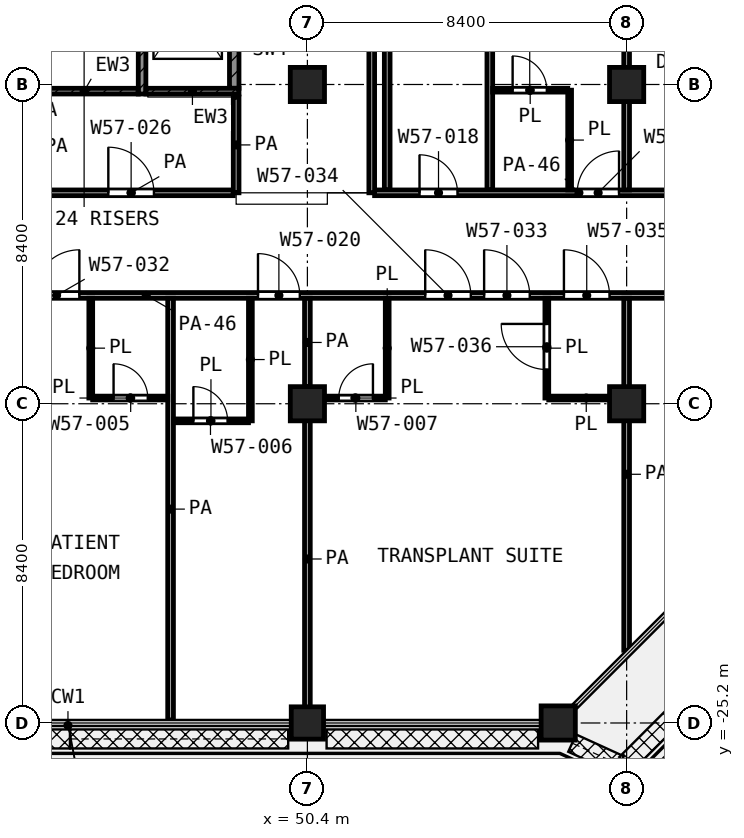
"""IFC4 building model, lengths in metres.
Left out: names, types, materials, properties, quantities, classifications, styles, units other than length and angle.
Written with IfcOpenShell. Run it as: python <this file> out.ifc"""

import sys

from ifc_helpers import new_model, si_unit, direction, frame, frame_2d, origin, origin_2d, place, context, subcontext, project, spatial, rectangle, extrude, element, fill, save


model = new_model("IFC4")
c1 = context("Model", 3, precision=1e-05, world=origin(), true_north=direction((0.0, 1.0)))
c2 = subcontext(c1, "Body", "Model", "MODEL_VIEW")
j1 = project(units=[si_unit("LENGTHUNIT", "METRE"), si_unit("PLANEANGLEUNIT", "RADIAN")], contexts=[c1])
p1 = place(None, origin())
s1 = spatial("IfcSite", under=j1, at=p1, CompositionType="ELEMENT")
p2 = place(p1, origin())
s2 = spatial("IfcBuilding", under=s1, at=p2, CompositionType="ELEMENT")
p3 = place(p2, frame((0.0, 0.0, 247.4)))
s3 = spatial("IfcBuildingStorey", under=s2, at=p3, CompositionType="ELEMENT", Elevation=247.4)
for number, where, z_axis, x_axis in (
    (1, (50.4, -8.4, 0.0), (0.0, 0.0, 1.0), (1.0, 0.0, 0.0)),
    (2, (58.8, -8.4, 0.0), (0.0, 0.0, 1.0), (1.0, 0.0, 0.0)),
    (3, (50.4, -16.8, 0.0), (0.0, 0.0, 1.0), (1.0, 0.0, 0.0)),
    (4, (58.8, -16.8, 0.0), (0.0, 0.0, 1.0), (1.0, 0.0, 0.0)),
):
    element("IfcColumn", number, at=place(p3, frame(where, z_axis=z_axis, x_axis=x_axis)), inside=s3, PredefinedType="COLUMN", context=c2, shape_type="SweptSolid", body=[
        extrude(rectangle(XDim=0.9, YDim=0.9, at=origin_2d()), origin(), (0.0, 0.0, 1.0), 4.2),
    ])
p4 = place(p3, frame((50.4, -25.2, 0.0), z_axis=(0.0, 0.0, 1.0), x_axis=(1.0, 0.0, 0.0)))
e5 = element("IfcColumn", 5, at=p4, inside=s3, PredefinedType="COLUMN", context=c2, shape_type="SweptSolid", body=[
    extrude(rectangle(XDim=0.85, YDim=0.85, at=origin_2d()), origin(), (0.0, 0.0, 1.0), 4.2),
])
p5 = place(p3, frame((57.0, -25.2, 0.0), z_axis=(0.0, 0.0, 1.0), x_axis=(1.0, 0.0, 0.0)))
e6 = element("IfcColumn", 6, at=p5, inside=s3, PredefinedType="COLUMN", context=c2, shape_type="SweptSolid", body=[
    extrude(rectangle(XDim=0.9, YDim=0.9, at=origin_2d()), origin(), (0.0, 0.0, 1.0), 4.2),
])
p6 = place(p3, frame((46.05, -8.65, 0.0), z_axis=(0.0, 0.0, 1.0), x_axis=(0.0, 1.0, 0.0)))
e7 = element("IfcWall", 7, at=p6, inside=s3, PredefinedType="SHEAR", context=c2, shape_type="SweptSolid", body=[
    extrude(rectangle(XDim=8.35, YDim=0.2, at=frame_2d((4.175, 0.0))), origin(), (0.0, 0.0, 1.0), 3.6),
])
p7 = place(p6, frame((7.0, 0.0, 0.0)))
e8 = element("IfcOpeningElement", 8, at=p7, cuts=e7, PredefinedType="OPENING", context=c2, shape_type="SweptSolid", body=[
    extrude(rectangle(XDim=1.1, YDim=2.1, at=frame_2d((0.55, 1.05))), frame((0.0, 0.11, 0.0), z_axis=(0.0, -1.0, 0.0), x_axis=(1.0, 0.0, 0.0)), (0.0, 0.0, 1.0), 0.22),
])
p8 = place(p3, frame((43.1, -8.575, 0.0), z_axis=(0.0, 0.0, 1.0), x_axis=(1.0, 0.0, 0.0)))
e9 = element("IfcWall", 9, at=p8, inside=s3, PredefinedType="SHEAR", context=c2, shape_type="SweptSolid", body=[
    extrude(rectangle(XDim=2.85, YDim=0.15, at=frame_2d((1.425, 0.0))), origin(), (0.0, 0.0, 1.0), 3.6),
])
p9 = place(p3, frame((46.15, -8.575, 0.0), z_axis=(0.0, 0.0, 1.0), x_axis=(1.0, 0.0, 0.0)))
e10 = element("IfcWall", 10, at=p9, inside=s3, PredefinedType="SHEAR", context=c2, shape_type="SweptSolid", body=[
    extrude(rectangle(XDim=2.45, YDim=0.15, at=frame_2d((1.225, 0.0))), origin(), (0.0, 0.0, 1.0), 3.6),
])
p10 = place(p3, frame((48.475, -8.5, 0.0), z_axis=(0.0, 0.0, 1.0), x_axis=(0.0, 1.0, 0.0)))
e11 = element("IfcWall", 11, at=p10, inside=s3, PredefinedType="SHEAR", context=c2, shape_type="SweptSolid", body=[
    extrude(rectangle(XDim=3.475, YDim=0.25, at=frame_2d((1.738, 0.0))), origin(), (0.0, 0.0, 1.0), 3.6),
])
p11 = place(p3, frame((46.875, -17.25, 0.0), z_axis=(0.0, 0.0, 1.0), x_axis=(1.0, 0.0, 0.0)))
e12 = element("IfcWall", 12, at=p11, inside=s3, PredefinedType="PARTITIONING", context=c2, shape_type="SweptSolid", body=[
    extrude(rectangle(XDim=1.975, YDim=0.1, at=frame_2d((0.988, 0.0))), origin(), (0.0, 0.0, 1.0), 3.6),
])
p12 = place(p11, frame((0.525, 0.0, 0.0)))
e13 = element("IfcOpeningElement", 13, at=p12, cuts=e12, PredefinedType="OPENING", context=c2, shape_type="SweptSolid", body=[
    extrude(rectangle(XDim=0.9, YDim=2.1, at=frame_2d((0.45, 1.05))), frame((0.0, 0.06, 0.0), z_axis=(0.0, -1.0, 0.0), x_axis=(1.0, 0.0, 0.0)), (0.0, 0.0, 1.0), 0.12),
])
p13 = place(p3, frame((44.75, -16.65, 0.0), z_axis=(0.0, 0.0, 1.0), x_axis=(1.0, 0.0, 0.0)))
e14 = element("IfcWall", 14, at=p13, inside=s3, PredefinedType="PARTITIONING", context=c2, shape_type="SweptSolid", body=[
    extrude(rectangle(XDim=1.975, YDim=0.1, at=frame_2d((0.988, 0.0))), origin(), (0.0, 0.0, 1.0), 3.6),
])
p14 = place(p13, frame((0.55, 0.0, 0.0)))
e15 = element("IfcOpeningElement", 15, at=p14, cuts=e14, PredefinedType="OPENING", context=c2, shape_type="SweptSolid", body=[
    extrude(rectangle(XDim=0.9, YDim=2.1, at=frame_2d((0.45, 1.05))), frame((0.0, 0.06, 0.0), z_axis=(0.0, -1.0, 0.0), x_axis=(1.0, 0.0, 0.0)), (0.0, 0.0, 1.0), 0.12),
])
p15 = place(p3, frame((50.85, -16.65, 0.0), z_axis=(0.0, 0.0, 1.0), x_axis=(1.0, 0.0, 0.0)))
e16 = element("IfcWall", 16, at=p15, inside=s3, PredefinedType="PARTITIONING", context=c2, shape_type="SweptSolid", body=[
    extrude(rectangle(XDim=1.6, YDim=0.1, at=frame_2d((0.8, 0.0))), origin(), (0.0, 0.0, 1.0), 3.6),
])
p16 = place(p15, frame((0.375, 0.0, 0.0)))
e17 = element("IfcOpeningElement", 17, at=p16, cuts=e16, PredefinedType="OPENING", context=c2, shape_type="SweptSolid", body=[
    extrude(rectangle(XDim=0.9, YDim=2.1, at=frame_2d((0.45, 1.05))), frame((0.0, 0.06, 0.0), z_axis=(0.0, -1.0, 0.0), x_axis=(1.0, 0.0, 0.0)), (0.0, 0.0, 1.0), 0.12),
])
p17 = place(p3, frame((56.75, -16.65, 0.0), z_axis=(0.0, 0.0, 1.0), x_axis=(1.0, 0.0, 0.0)))
e18 = element("IfcWall", 18, at=p17, inside=s3, PredefinedType="PARTITIONING", context=c2, shape_type="SweptSolid", body=[
    extrude(rectangle(XDim=1.975, YDim=0.1, at=frame_2d((0.988, 0.0))), origin(), (0.0, 0.0, 1.0), 3.6),
])
p18 = place(p3, frame((55.275, -8.55, 0.0), z_axis=(0.0, 0.0, 1.0), x_axis=(1.0, 0.0, 0.0)))
e19 = element("IfcWall", 19, at=p18, inside=s3, PredefinedType="PARTITIONING", context=c2, shape_type="SweptSolid", body=[
    extrude(rectangle(XDim=1.975, YDim=0.1, at=frame_2d((0.988, 0.0))), origin(), (0.0, 0.0, 1.0), 3.6),
])
p19 = place(p18, frame((0.525, 0.0, 0.0)))
e20 = element("IfcOpeningElement", 20, at=p19, cuts=e19, PredefinedType="OPENING", context=c2, shape_type="SweptSolid", body=[
    extrude(rectangle(XDim=0.9, YDim=2.1, at=frame_2d((0.45, 1.05))), frame((0.0, 0.06, 0.0), z_axis=(0.0, -1.0, 0.0), x_axis=(1.0, 0.0, 0.0)), (0.0, 0.0, 1.0), 0.12),
])
p20 = place(p3, frame((44.7, -16.65, 0.0), z_axis=(0.0, 0.0, 1.0), x_axis=(0.0, 1.0, 0.0)))
e21 = element("IfcWall", 21, at=p20, inside=s3, PredefinedType="PARTITIONING", context=c2, shape_type="SweptSolid", body=[
    extrude(rectangle(XDim=2.625, YDim=0.1, at=frame_2d((1.312, 0.0))), origin(), (0.0, 0.0, 1.0), 3.6),
])
p21 = place(p3, frame((48.9, -17.25, 0.0), z_axis=(0.0, 0.0, 1.0), x_axis=(0.0, 1.0, 0.0)))
e22 = element("IfcWall", 22, at=p21, inside=s3, PredefinedType="PARTITIONING", context=c2, shape_type="SweptSolid", body=[
    extrude(rectangle(XDim=3.225, YDim=0.1, at=frame_2d((1.613, 0.0))), origin(), (0.0, 0.0, 1.0), 3.6),
])
p22 = place(p3, frame((52.5, -16.65, 0.0), z_axis=(0.0, 0.0, 1.0), x_axis=(0.0, 1.0, 0.0)))
e23 = element("IfcWall", 23, at=p22, inside=s3, PredefinedType="PARTITIONING", context=c2, shape_type="SweptSolid", body=[
    extrude(rectangle(XDim=2.625, YDim=0.1, at=frame_2d((1.312, 0.0))), origin(), (0.0, 0.0, 1.0), 3.6),
])
p23 = place(p3, frame((56.7, -16.65, 0.0), z_axis=(0.0, 0.0, 1.0), x_axis=(0.0, 1.0, 0.0)))
e24 = element("IfcWall", 24, at=p23, inside=s3, PredefinedType="PARTITIONING", context=c2, shape_type="SweptSolid", body=[
    extrude(rectangle(XDim=2.625, YDim=0.1, at=frame_2d((1.312, 0.0))), origin(), (0.0, 0.0, 1.0), 3.6),
])
p24 = place(p23, frame((0.75, 0.0, 0.0)))
e25 = element("IfcOpeningElement", 25, at=p24, cuts=e24, PredefinedType="OPENING", context=c2, shape_type="SweptSolid", body=[
    extrude(rectangle(XDim=1.2, YDim=2.1, at=frame_2d((0.6, 1.05))), frame((0.0, 0.06, 0.0), z_axis=(0.0, -1.0, 0.0), x_axis=(1.0, 0.0, 0.0)), (0.0, 0.0, 1.0), 0.12),
])
p25 = place(p3, frame((57.3, -11.175, 0.0), z_axis=(0.0, 0.0, 1.0), x_axis=(0.0, 1.0, 0.0)))
e26 = element("IfcWall", 26, at=p25, inside=s3, PredefinedType="PARTITIONING", context=c2, shape_type="SweptSolid", body=[
    extrude(rectangle(XDim=2.625, YDim=0.1, at=frame_2d((1.312, 0.0))), origin(), (0.0, 0.0, 1.0), 3.6),
])
p26 = place(p3, frame((29.4, -13.95, 0.0), z_axis=(0.0, 0.0, 1.0), x_axis=(1.0, 0.0, 0.0)))
e27 = element("IfcWall", 27, at=p26, inside=s3, PredefinedType="PARTITIONING", context=c2, shape_type="SweptSolid", body=[
    extrude(rectangle(XDim=33.52, YDim=0.15, at=frame_2d((16.76, 0.0))), origin(), (0.0, 0.0, 1.0), 2.7),
])
p27 = place(p26, frame((1.5, 0.0, 0.0)))
e28 = element("IfcOpeningElement", 28, at=p27, cuts=e27, PredefinedType="OPENING", context=c2, shape_type="SweptSolid", body=[
    extrude(rectangle(XDim=1.2, YDim=2.1, at=frame_2d((0.6, 1.05))), frame((0.0, 0.085, 0.0), z_axis=(0.0, -1.0, 0.0), x_axis=(1.0, 0.0, 0.0)), (0.0, 0.0, 1.0), 0.17),
])
p28 = place(p26, frame((8.85, 0.0, 0.0)))
e29 = element("IfcOpeningElement", 29, at=p28, cuts=e27, PredefinedType="OPENING", context=c2, shape_type="SweptSolid", body=[
    extrude(rectangle(XDim=1.2, YDim=2.1, at=frame_2d((0.6, 1.05))), frame((0.0, 0.085, 0.0), z_axis=(0.0, -1.0, 0.0), x_axis=(1.0, 0.0, 0.0)), (0.0, 0.0, 1.0), 0.17),
])
p29 = place(p26, frame((7.3, 0.0, 0.0)))
e30 = element("IfcOpeningElement", 30, at=p29, cuts=e27, PredefinedType="OPENING", context=c2, shape_type="SweptSolid", body=[
    extrude(rectangle(XDim=1.2, YDim=2.1, at=frame_2d((0.6, 1.05))), frame((0.0, 0.085, 0.0), z_axis=(0.0, -1.0, 0.0), x_axis=(1.0, 0.0, 0.0)), (0.0, 0.0, 1.0), 0.17),
])
p30 = place(p26, frame((10.95, 0.0, 0.0)))
e31 = element("IfcOpeningElement", 31, at=p30, cuts=e27, PredefinedType="OPENING", context=c2, shape_type="SweptSolid", body=[
    extrude(rectangle(XDim=1.2, YDim=2.1, at=frame_2d((0.6, 1.05))), frame((0.0, 0.085, 0.0), z_axis=(0.0, -1.0, 0.0), x_axis=(1.0, 0.0, 0.0)), (0.0, 0.0, 1.0), 0.17),
])
p31 = place(p26, frame((13.8, 0.0, 0.0)))
e32 = element("IfcOpeningElement", 32, at=p31, cuts=e27, PredefinedType="OPENING", context=c2, shape_type="SweptSolid", body=[
    extrude(rectangle(XDim=1.2, YDim=2.1, at=frame_2d((0.6, 1.05))), frame((0.0, 0.085, 0.0), z_axis=(0.0, -1.0, 0.0), x_axis=(1.0, 0.0, 0.0)), (0.0, 0.0, 1.0), 0.17),
])
p32 = place(p26, frame((19.7, 0.0, 0.0)))
e33 = element("IfcOpeningElement", 33, at=p32, cuts=e27, PredefinedType="OPENING", context=c2, shape_type="SweptSolid", body=[
    extrude(rectangle(XDim=1.1, YDim=2.1, at=frame_2d((0.55, 1.05))), frame((0.0, 0.085, 0.0), z_axis=(0.0, -1.0, 0.0), x_axis=(1.0, 0.0, 0.0)), (0.0, 0.0, 1.0), 0.17),
])
p33 = place(p26, frame((25.65, 0.0, 0.0)))
e34 = element("IfcOpeningElement", 34, at=p33, cuts=e27, PredefinedType="OPENING", context=c2, shape_type="SweptSolid", body=[
    extrude(rectangle(XDim=1.2, YDim=2.1, at=frame_2d((0.6, 1.05))), frame((0.0, 0.085, 0.0), z_axis=(0.0, -1.0, 0.0), x_axis=(1.0, 0.0, 0.0)), (0.0, 0.0, 1.0), 0.17),
])
p34 = place(p26, frame((24.1, 0.0, 0.0)))
e35 = element("IfcOpeningElement", 35, at=p34, cuts=e27, PredefinedType="OPENING", context=c2, shape_type="SweptSolid", body=[
    extrude(rectangle(XDim=1.2, YDim=2.1, at=frame_2d((0.6, 1.05))), frame((0.0, 0.085, 0.0), z_axis=(0.0, -1.0, 0.0), x_axis=(1.0, 0.0, 0.0)), (0.0, 0.0, 1.0), 0.17),
])
p35 = place(p26, frame((27.75, 0.0, 0.0)))
e36 = element("IfcOpeningElement", 36, at=p35, cuts=e27, PredefinedType="OPENING", context=c2, shape_type="SweptSolid", body=[
    extrude(rectangle(XDim=1.2, YDim=2.1, at=frame_2d((0.6, 1.05))), frame((0.0, 0.085, 0.0), z_axis=(0.0, -1.0, 0.0), x_axis=(1.0, 0.0, 0.0)), (0.0, 0.0, 1.0), 0.17),
])
p36 = place(p26, frame((31.0, 0.0, 0.0)))
e37 = element("IfcOpeningElement", 37, at=p36, cuts=e27, PredefinedType="OPENING", context=c2, shape_type="SweptSolid", body=[
    extrude(rectangle(XDim=1.0, YDim=2.1, at=frame_2d((0.5, 1.05))), frame((0.0, 0.085, 0.0), z_axis=(0.0, -1.0, 0.0), x_axis=(1.0, 0.0, 0.0)), (0.0, 0.0, 1.0), 0.17),
])
p37 = place(p3, frame((43.075, -11.25, 0.0), z_axis=(0.0, 0.0, 1.0), x_axis=(1.0, 0.0, 0.0)))
e38 = element("IfcWall", 38, at=p37, inside=s3, PredefinedType="PARTITIONING", context=c2, shape_type="SweptSolid", body=[
    extrude(rectangle(XDim=5.375, YDim=0.15, at=frame_2d((2.688, 0.0))), origin(), (0.0, 0.0, 1.0), 3.6),
])
p38 = place(p37, frame((2.087, 0.0, 0.0)))
e39 = element("IfcOpeningElement", 39, at=p38, cuts=e38, PredefinedType="OPENING", context=c2, shape_type="SweptSolid", body=[
    extrude(rectangle(XDim=1.2, YDim=2.1, at=frame_2d((0.6, 1.05))), frame((0.0, 0.085, 0.0), z_axis=(0.0, -1.0, 0.0), x_axis=(1.0, 0.0, 0.0)), (0.0, 0.0, 1.0), 0.17),
])
p39 = place(p3, frame((52.168, -11.25, 0.0), z_axis=(0.0, 0.0, 1.0), x_axis=(1.0, 0.0, 0.0)))
e40 = element("IfcWall", 40, at=p39, inside=s3, PredefinedType="PARTITIONING", context=c2, shape_type="SweptSolid", body=[
    extrude(rectangle(XDim=10.752, YDim=0.15, at=frame_2d((5.376, 0.0))), origin(), (0.0, 0.0, 1.0), 2.7),
])
p40 = place(p39, frame((5.332, 0.0, 0.0)))
e41 = element("IfcOpeningElement", 41, at=p40, cuts=e40, PredefinedType="OPENING", context=c2, shape_type="SweptSolid", body=[
    extrude(rectangle(XDim=1.1, YDim=2.1, at=frame_2d((0.55, 1.05))), frame((0.0, 0.085, 0.0), z_axis=(0.0, -1.0, 0.0), x_axis=(1.0, 0.0, 0.0)), (0.0, 0.0, 1.0), 0.17),
])
p41 = place(p39, frame((8.232, 0.0, 0.0)))
e42 = element("IfcOpeningElement", 42, at=p41, cuts=e40, PredefinedType="OPENING", context=c2, shape_type="SweptSolid", body=[
    extrude(rectangle(XDim=1.0, YDim=2.1, at=frame_2d((0.5, 1.05))), frame((0.0, 0.085, 0.0), z_axis=(0.0, -1.0, 0.0), x_axis=(1.0, 0.0, 0.0)), (0.0, 0.0, 1.0), 0.17),
])
p42 = place(p39, frame((1.182, 0.0, 0.0)))
e43 = element("IfcOpeningElement", 43, at=p42, cuts=e40, PredefinedType="OPENING", context=c2, shape_type="SweptSolid", body=[
    extrude(rectangle(XDim=1.0, YDim=2.1, at=frame_2d((0.5, 1.05))), frame((0.0, 0.085, 0.0), z_axis=(0.0, -1.0, 0.0), x_axis=(1.0, 0.0, 0.0)), (0.0, 0.0, 1.0), 0.17),
])
p43 = place(p3, frame((46.8, -25.12, 0.0), z_axis=(0.0, 0.0, 1.0), x_axis=(0.0, 1.0, 0.0)))
e44 = element("IfcWall", 44, at=p43, inside=s3, PredefinedType="PARTITIONING", context=c2, shape_type="SweptSolid", body=[
    extrude(rectangle(XDim=11.095, YDim=0.15, at=frame_2d((5.548, 0.0))), origin(), (0.0, 0.0, 1.0), 3.6),
])
p44 = place(p3, frame((48.525, -11.25, 0.0), z_axis=(0.0, 0.0, 1.0), x_axis=(0.0, 1.0, 0.0)))
e45 = element("IfcWall", 45, at=p44, inside=s3, PredefinedType="PARTITIONING", context=c2, shape_type="SweptSolid", body=[
    extrude(rectangle(XDim=2.52, YDim=0.15, at=frame_2d((1.26, 0.0))), origin(), (0.0, 0.0, 1.0), 3.6),
])
p45 = place(p3, frame((50.4, -25.12, 0.0), z_axis=(0.0, 0.0, 1.0), x_axis=(0.0, 1.0, 0.0)))
e46 = element("IfcWall", 46, at=p45, inside=s3, PredefinedType="PARTITIONING", context=c2, shape_type="SweptSolid", body=[
    extrude(rectangle(XDim=8.47, YDim=0.15, at=frame_2d((4.235, 0.0))), origin(), (0.0, 0.0, 1.0), 3.6),
])
p46 = place(p3, frame((50.4, -16.35, 0.0), z_axis=(0.0, 0.0, 1.0), x_axis=(0.0, 1.0, 0.0)))
e47 = element("IfcWall", 47, at=p46, inside=s3, PredefinedType="PARTITIONING", context=c2, shape_type="SweptSolid", body=[
    extrude(rectangle(XDim=2.325, YDim=0.15, at=frame_2d((1.163, 0.0))), origin(), (0.0, 0.0, 1.0), 3.6),
])
p47 = place(p3, frame((52.093, -11.25, 0.0), z_axis=(0.0, 0.0, 1.0), x_axis=(0.0, 1.0, 0.0)))
e48 = element("IfcWall", 48, at=p47, inside=s3, PredefinedType="PARTITIONING", context=c2, shape_type="SweptSolid", body=[
    extrude(rectangle(XDim=9.399, YDim=0.15, at=frame_2d((4.699, 0.0))), origin(), (0.0, 0.0, 1.0), 3.6),
])
for number, where, z_axis, x_axis in (
    (49, (52.5, -11.175, 0.0), (0.0, 0.0, 1.0), (0.0, 1.0, 0.0)),
    (50, (55.2, -11.175, 0.0), (0.0, 0.0, 1.0), (0.0, 1.0, 0.0)),
):
    element("IfcWall", number, at=place(p3, frame(where, z_axis=z_axis, x_axis=x_axis)), inside=s3, PredefinedType="PARTITIONING", context=c2, shape_type="SweptSolid", body=[
        extrude(rectangle(XDim=11.095, YDim=0.15, at=frame_2d((5.547, 0.0))), origin(), (0.0, 0.0, 1.0), 3.6),
    ])
p48 = place(p3, frame((58.8, -23.287, 0.0), z_axis=(0.0, 0.0, 1.0), x_axis=(0.0, 1.0, 0.0)))
e51 = element("IfcWall", 51, at=p48, inside=s3, PredefinedType="PARTITIONING", context=c2, shape_type="SweptSolid", body=[
    extrude(rectangle(XDim=9.262, YDim=0.15, at=frame_2d((4.631, 0.0))), origin(), (0.0, 0.0, 1.0), 2.7),
])
p49 = place(p3, frame((58.8, -11.175, 0.0), z_axis=(0.0, 0.0, 1.0), x_axis=(0.0, 1.0, 0.0)))
e52 = element("IfcWall", 52, at=p49, inside=s3, PredefinedType="PARTITIONING", context=c2, shape_type="SweptSolid", body=[
    extrude(rectangle(XDim=9.262, YDim=0.15, at=frame_2d((4.631, 0.0))), origin(), (0.0, 0.0, 1.0), 2.7),
])
p50 = place(p38, origin())
e53 = element("IfcDoor", 53, at=p50, inside=s3, OperationType="SINGLE_SWING_LEFT", PredefinedType="DOOR", context=c2, shape_type="SweptSolid", body=[
    extrude(rectangle(XDim=1.2, YDim=2.1, at=frame_2d((0.6, 1.05))), frame((0.0, 0.025, 0.0), z_axis=(0.0, -1.0, 0.0), x_axis=(1.0, 0.0, 0.0)), (0.0, 0.0, 1.0), 0.05),
])
fill(e39, e53)
p51 = place(p40, origin())
e54 = element("IfcDoor", 54, at=p51, inside=s3, OperationType="SINGLE_SWING_RIGHT", PredefinedType="DOOR", context=c2, shape_type="SweptSolid", body=[
    extrude(rectangle(XDim=1.1, YDim=2.1, at=frame_2d((0.55, 1.05))), frame((0.0, 0.025, 0.0), z_axis=(0.0, -1.0, 0.0), x_axis=(1.0, 0.0, 0.0)), (0.0, 0.0, 1.0), 0.05),
])
fill(e41, e54)
p52 = place(p19, origin())
e55 = element("IfcDoor", 55, at=p52, inside=s3, OperationType="SINGLE_SWING_LEFT", PredefinedType="DOOR", context=c2, shape_type="SweptSolid", body=[
    extrude(rectangle(XDim=0.9, YDim=2.1, at=frame_2d((0.45, 1.05))), frame((0.0, 0.025, 0.0), z_axis=(0.0, -1.0, 0.0), x_axis=(1.0, 0.0, 0.0)), (0.0, 0.0, 1.0), 0.05),
])
fill(e20, e55)
p53 = place(p31, origin())
e56 = element("IfcDoor", 56, at=p53, inside=s3, OperationType="SINGLE_SWING_RIGHT", PredefinedType="DOOR", context=c2, shape_type="SweptSolid", body=[
    extrude(rectangle(XDim=1.2, YDim=2.1, at=frame_2d((0.6, 1.05))), frame((0.0, 0.025, 0.0), z_axis=(0.0, -1.0, 0.0), x_axis=(1.0, 0.0, 0.0)), (0.0, 0.0, 1.0), 0.05),
])
fill(e32, e56)
p54 = place(p14, origin())
e57 = element("IfcDoor", 57, at=p54, inside=s3, OperationType="SINGLE_SWING_LEFT", PredefinedType="DOOR", context=c2, shape_type="SweptSolid", body=[
    extrude(rectangle(XDim=0.9, YDim=2.1, at=frame_2d((0.45, 1.05))), frame((0.0, 0.025, 0.0), z_axis=(0.0, -1.0, 0.0), x_axis=(1.0, 0.0, 0.0)), (0.0, 0.0, 1.0), 0.05),
])
fill(e15, e57)
p55 = place(p32, origin())
e58 = element("IfcDoor", 58, at=p55, inside=s3, OperationType="SINGLE_SWING_LEFT", PredefinedType="DOOR", context=c2, shape_type="SweptSolid", body=[
    extrude(rectangle(XDim=1.1, YDim=2.1, at=frame_2d((0.55, 1.05))), frame((0.0, 0.025, 0.0), z_axis=(0.0, -1.0, 0.0), x_axis=(1.0, 0.0, 0.0)), (0.0, 0.0, 1.0), 0.05),
])
fill(e33, e58)
p56 = place(p12, origin())
e59 = element("IfcDoor", 59, at=p56, inside=s3, OperationType="SINGLE_SWING_LEFT", PredefinedType="DOOR", context=c2, shape_type="SweptSolid", body=[
    extrude(rectangle(XDim=0.9, YDim=2.1, at=frame_2d((0.45, 1.05))), frame((0.0, 0.025, 0.0), z_axis=(0.0, -1.0, 0.0), x_axis=(1.0, 0.0, 0.0)), (0.0, 0.0, 1.0), 0.05),
])
fill(e13, e59)
p57 = place(p33, origin())
e60 = element("IfcDoor", 60, at=p57, inside=s3, OperationType="SINGLE_SWING_LEFT", PredefinedType="DOOR", context=c2, shape_type="SweptSolid", body=[
    extrude(rectangle(XDim=1.2, YDim=2.1, at=frame_2d((0.6, 1.05))), frame((0.0, 0.025, 0.0), z_axis=(0.0, -1.0, 0.0), x_axis=(1.0, 0.0, 0.0)), (0.0, 0.0, 1.0), 0.05),
])
fill(e34, e60)
p58 = place(p34, origin())
e61 = element("IfcDoor", 61, at=p58, inside=s3, OperationType="SINGLE_SWING_LEFT", PredefinedType="DOOR", context=c2, shape_type="SweptSolid", body=[
    extrude(rectangle(XDim=1.2, YDim=2.1, at=frame_2d((0.6, 1.05))), frame((0.0, 0.025, 0.0), z_axis=(0.0, -1.0, 0.0), x_axis=(1.0, 0.0, 0.0)), (0.0, 0.0, 1.0), 0.05),
])
fill(e35, e61)
p59 = place(p35, origin())
e62 = element("IfcDoor", 62, at=p59, inside=s3, OperationType="SINGLE_SWING_LEFT", PredefinedType="DOOR", context=c2, shape_type="SweptSolid", body=[
    extrude(rectangle(XDim=1.2, YDim=2.1, at=frame_2d((0.6, 1.05))), frame((0.0, 0.025, 0.0), z_axis=(0.0, -1.0, 0.0), x_axis=(1.0, 0.0, 0.0)), (0.0, 0.0, 1.0), 0.05),
])
fill(e36, e62)
p60 = place(p24, origin())
e63 = element("IfcDoor", 63, at=p60, inside=s3, OperationType="SINGLE_SWING_RIGHT", PredefinedType="DOOR", context=c2, shape_type="SweptSolid", body=[
    extrude(rectangle(XDim=1.2, YDim=2.1, at=frame_2d((0.6, 1.05))), frame((0.0, 0.025, 0.0), z_axis=(0.0, -1.0, 0.0), x_axis=(1.0, 0.0, 0.0)), (0.0, 0.0, 1.0), 0.05),
])
fill(e25, e63)
p61 = place(p16, origin())
e64 = element("IfcDoor", 64, at=p61, inside=s3, OperationType="SINGLE_SWING_RIGHT", PredefinedType="DOOR", context=c2, shape_type="SweptSolid", body=[
    extrude(rectangle(XDim=0.9, YDim=2.1, at=frame_2d((0.45, 1.05))), frame((0.0, 0.025, 0.0), z_axis=(0.0, -1.0, 0.0), x_axis=(1.0, 0.0, 0.0)), (0.0, 0.0, 1.0), 0.05),
])
fill(e17, e64)
p62 = place(p42, origin())
e65 = element("IfcDoor", 65, at=p62, inside=s3, OperationType="SINGLE_SWING_LEFT", PredefinedType="DOOR", context=c2, shape_type="SweptSolid", body=[
    extrude(rectangle(XDim=1.0, YDim=2.1, at=frame_2d((0.5, 1.05))), frame((0.0, 0.025, 0.0), z_axis=(0.0, -1.0, 0.0), x_axis=(1.0, 0.0, 0.0)), (0.0, 0.0, 1.0), 0.05),
])
fill(e43, e65)
save(model, sys.argv[1])
